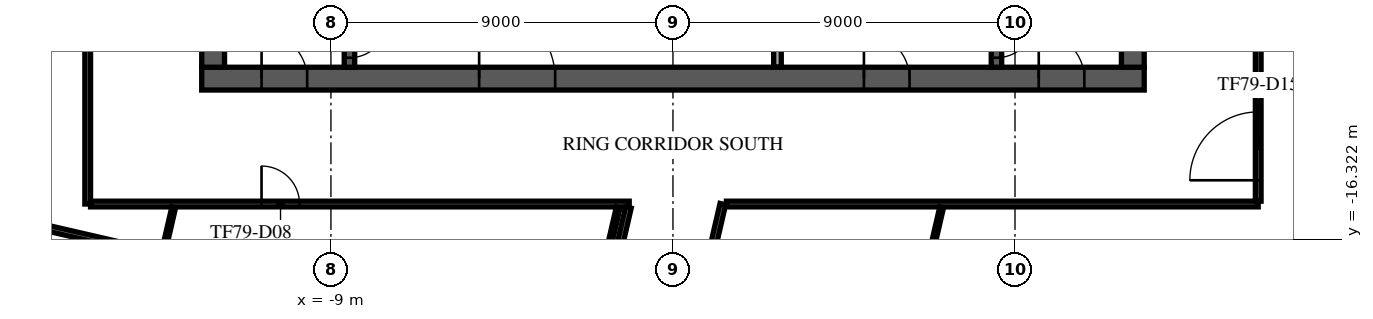
"""IFC4 building model, lengths in metres.
Left out: names, types, materials, properties, quantities, classifications, styles, units other than length and angle.
Written with IfcOpenShell. Run it as: python <this file> out.ifc"""

import sys

from ifc_helpers import new_model, si_unit, direction, frame, frame_2d, origin, place, context, subcontext, project, spatial, rectangle, extrude, element, fill, save


model = new_model("IFC4")
c1 = context("Model", 3, precision=1e-05, world=origin(), true_north=direction((0.0, 1.0)))
c2 = subcontext(c1, "Body", "Model", "MODEL_VIEW")
j1 = project(units=[si_unit("LENGTHUNIT", "METRE"), si_unit("PLANEANGLEUNIT", "RADIAN")], contexts=[c1])
p1 = place(None, origin())
s1 = spatial("IfcSite", under=j1, at=p1, CompositionType="ELEMENT")
p2 = place(p1, origin())
s2 = spatial("IfcBuilding", under=s1, at=p2, CompositionType="ELEMENT")
p3 = place(p2, frame((0.0, 0.0, 332.5)))
s3 = spatial("IfcBuildingStorey", under=s2, at=p3, CompositionType="ELEMENT", Elevation=332.5)
p4 = place(p3, frame((-12.4, -12.1, 0.0), z_axis=(0.0, 0.0, 1.0), x_axis=(1.0, 0.0, 0.0)))
e1 = element("IfcWall", 1, at=p4, inside=s3, PredefinedType="SHEAR", context=c2, shape_type="SweptSolid", body=[
    extrude(rectangle(XDim=24.8, YDim=0.6, at=frame_2d((12.4, 0.0))), origin(), (0.0, 0.0, 1.0), 3.65),
])
p5 = place(p4, frame((7.3, 0.0, 0.0)))
e2 = element("IfcOpeningElement", 2, at=p5, cuts=e1, PredefinedType="OPENING", context=c2, shape_type="SweptSolid", body=[
    extrude(rectangle(XDim=2.0, YDim=2.1, at=frame_2d((1.0, 1.05))), frame((0.0, 0.31, 0.0), z_axis=(0.0, -1.0, 0.0), x_axis=(1.0, 0.0, 0.0)), (0.0, 0.0, 1.0), 0.62),
])
p6 = place(p4, frame((17.425, 0.0, 0.0)))
e3 = element("IfcOpeningElement", 3, at=p6, cuts=e1, PredefinedType="OPENING", context=c2, shape_type="SweptSolid", body=[
    extrude(rectangle(XDim=1.2, YDim=2.1, at=frame_2d((0.6, 1.05))), frame((0.0, 0.31, 0.0), z_axis=(0.0, -1.0, 0.0), x_axis=(1.0, 0.0, 0.0)), (0.0, 0.0, 1.0), 0.62),
])
p7 = place(p4, frame((1.575, 0.0, 0.0)))
e4 = element("IfcOpeningElement", 4, at=p7, cuts=e1, PredefinedType="OPENING", context=c2, shape_type="SweptSolid", body=[
    extrude(rectangle(XDim=1.2, YDim=2.1, at=frame_2d((0.6, 1.05))), frame((0.0, 0.31, 0.0), z_axis=(0.0, -1.0, 0.0), x_axis=(1.0, 0.0, 0.0)), (0.0, 0.0, 1.0), 0.62),
])
p8 = place(p4, frame((22.025, 0.0, 0.0)))
e5 = element("IfcOpeningElement", 5, at=p8, cuts=e1, PredefinedType="OPENING", context=c2, shape_type="SweptSolid", body=[
    extrude(rectangle(XDim=1.2, YDim=2.1, at=frame_2d((0.6, 1.05))), frame((0.0, 0.31, 0.0), z_axis=(0.0, -1.0, 0.0), x_axis=(1.0, 0.0, 0.0)), (0.0, 0.0, 1.0), 0.62),
])
p9 = place(p3, frame((12.1, -11.8, 0.0), z_axis=(0.0, 0.0, 1.0), x_axis=(0.0, 1.0, 0.0)))
e6 = element("IfcWall", 6, at=p9, inside=s3, PredefinedType="SHEAR", context=c2, shape_type="SweptSolid", body=[
    extrude(rectangle(XDim=23.6, YDim=0.6, at=frame_2d((11.8, 0.0))), origin(), (0.0, 0.0, 1.0), 3.65),
])
p10 = place(p9, frame((10.6, 0.0, 0.0)))
e7 = element("IfcOpeningElement", 7, at=p10, cuts=e6, PredefinedType="OPENING", context=c2, shape_type="SweptSolid", body=[
    extrude(rectangle(XDim=2.4, YDim=2.4, at=frame_2d((1.2, 1.2))), frame((0.0, 0.31, 0.0), z_axis=(0.0, -1.0, 0.0), x_axis=(1.0, 0.0, 0.0)), (0.0, 0.0, 1.0), 0.62),
])
p11 = place(p3, frame((-12.1, -11.8, 0.0), z_axis=(0.0, 0.0, 1.0), x_axis=(0.0, 1.0, 0.0)))
e8 = element("IfcWall", 8, at=p11, inside=s3, PredefinedType="SHEAR", context=c2, shape_type="SweptSolid", body=[
    extrude(rectangle(XDim=23.6, YDim=0.6, at=frame_2d((11.8, 0.0))), origin(), (0.0, 0.0, 1.0), 3.65),
])
p12 = place(p11, frame((10.6, 0.0, 0.0)))
e9 = element("IfcOpeningElement", 9, at=p12, cuts=e8, PredefinedType="OPENING", context=c2, shape_type="SweptSolid", body=[
    extrude(rectangle(XDim=2.4, YDim=2.4, at=frame_2d((1.2, 1.2))), frame((0.0, 0.31, 0.0), z_axis=(0.0, -1.0, 0.0), x_axis=(1.0, 0.0, 0.0)), (0.0, 0.0, 1.0), 0.62),
])
p13 = place(p3, frame((-8.512, -4.55, 0.0), z_axis=(0.0, 0.0, 1.0), x_axis=(0.0, -1.0, 0.0)))
e10 = element("IfcWall", 10, at=p13, inside=s3, PredefinedType="SOLIDWALL", context=c2, shape_type="SweptSolid", body=[
    extrude(rectangle(XDim=7.25, YDim=0.275, at=frame_2d((3.625, 0.0))), origin(), (0.0, 0.0, 1.0), 3.65),
])
p14 = place(p13, frame((6.0, 0.0, 0.0)))
e11 = element("IfcOpeningElement", 11, at=p14, cuts=e10, PredefinedType="OPENING", context=c2, shape_type="SweptSolid", body=[
    extrude(rectangle(XDim=1.0, YDim=2.1, at=frame_2d((0.5, 1.05))), frame((0.0, 0.147, 0.0), z_axis=(0.0, -1.0, 0.0), x_axis=(1.0, 0.0, 0.0)), (0.0, 0.0, 1.0), 0.295),
])
p15 = place(p3, frame((8.512, -4.55, 0.0), z_axis=(0.0, 0.0, 1.0), x_axis=(0.0, -1.0, 0.0)))
e12 = element("IfcWall", 12, at=p15, inside=s3, PredefinedType="SOLIDWALL", context=c2, shape_type="SweptSolid", body=[
    extrude(rectangle(XDim=7.25, YDim=0.275, at=frame_2d((3.625, 0.0))), origin(), (0.0, 0.0, 1.0), 3.65),
])
p16 = place(p15, frame((6.0, 0.0, 0.0)))
e13 = element("IfcOpeningElement", 13, at=p16, cuts=e12, PredefinedType="OPENING", context=c2, shape_type="SweptSolid", body=[
    extrude(rectangle(XDim=1.0, YDim=2.1, at=frame_2d((0.5, 1.05))), frame((0.0, 0.147, 0.0), z_axis=(0.0, -1.0, 0.0), x_axis=(1.0, 0.0, 0.0)), (0.0, 0.0, 1.0), 0.295),
])
p17 = place(p3, frame((2.75, -11.795, 0.0), z_axis=(0.0, 0.0, 1.0), x_axis=(0.0, 1.0, 0.0)))
e14 = element("IfcWall", 14, at=p17, inside=s3, PredefinedType="PARTITIONING", context=c2, shape_type="SweptSolid", body=[
    extrude(rectangle(XDim=2.99, YDim=0.2, at=frame_2d((1.495, 0.0))), origin(), (0.0, 0.0, 1.0), 3.65),
])
p18 = place(p3, frame((-21.497, -14.872, 0.0), z_axis=(0.0, 0.0, 1.0), x_axis=(0.974371384758, -0.224945336838, 0.0)))
e15 = element("IfcWall", 15, at=p18, inside=s3, PredefinedType="PARTITIONING", context=c2, shape_type="SweptSolid", body=[
    extrude(rectangle(XDim=19.943, YDim=0.15, at=frame_2d((9.972, 0.0))), origin(), (0.0, 0.0, 1.0), 3.25),
])
p19 = place(p18, frame((3.8, 0.0, 0.0)))
e16 = element("IfcOpeningElement", 16, at=p19, cuts=e15, PredefinedType="OPENING", context=c2, shape_type="SweptSolid", body=[
    extrude(rectangle(XDim=1.0, YDim=2.1, at=frame_2d((0.5, 1.05))), frame((0.0, 0.085, 0.0), z_axis=(0.0, -1.0, 0.0), x_axis=(1.0, 0.0, 0.0)), (0.0, 0.0, 1.0), 0.17),
])
p20 = place(p3, frame((-15.4, -15.4, 0.0), z_axis=(0.0, 0.0, 1.0), x_axis=(0.0, 1.0, 0.0)))
e17 = element("IfcWall", 17, at=p20, inside=s3, PredefinedType="PARTITIONING", context=c2, shape_type="SweptSolid", body=[
    extrude(rectangle(XDim=30.8, YDim=0.15, at=frame_2d((15.4, 0.0))), origin(), (0.0, 0.0, 1.0), 3.25),
])
p21 = place(p20, frame((12.741, 0.0, 0.0)))
e18 = element("IfcOpeningElement", 18, at=p21, cuts=e17, PredefinedType="OPENING", context=c2, shape_type="SweptSolid", body=[
    extrude(rectangle(XDim=1.0, YDim=2.1, at=frame_2d((0.5, 1.05))), frame((0.0, 0.085, 0.0), z_axis=(0.0, -1.0, 0.0), x_axis=(1.0, 0.0, 0.0)), (0.0, 0.0, 1.0), 0.17),
])
p22 = place(p20, frame((6.05, 0.0, 0.0)))
e19 = element("IfcOpeningElement", 19, at=p22, cuts=e17, PredefinedType="OPENING", context=c2, shape_type="SweptSolid", body=[
    extrude(rectangle(XDim=1.8, YDim=2.1, at=frame_2d((0.9, 1.05))), frame((0.0, 0.085, 0.0), z_axis=(0.0, -1.0, 0.0), x_axis=(1.0, 0.0, 0.0)), (0.0, 0.0, 1.0), 0.17),
])
p23 = place(p20, frame((28.577, 0.0, 0.0)))
e20 = element("IfcOpeningElement", 20, at=p23, cuts=e17, PredefinedType="OPENING", context=c2, shape_type="SweptSolid", body=[
    extrude(rectangle(XDim=1.0, YDim=2.1, at=frame_2d((0.5, 1.05))), frame((0.0, 0.085, 0.0), z_axis=(0.0, -1.0, 0.0), x_axis=(1.0, 0.0, 0.0)), (0.0, 0.0, 1.0), 0.17),
])
p24 = place(p3, frame((-15.325, -15.4, 0.0), z_axis=(0.0, 0.0, 1.0), x_axis=(1.0, 0.0, 0.0)))
e21 = element("IfcWall", 21, at=p24, inside=s3, PredefinedType="PARTITIONING", context=c2, shape_type="SweptSolid", body=[
    extrude(rectangle(XDim=14.174, YDim=0.15, at=frame_2d((7.087, 0.0))), origin(), (0.0, 0.0, 1.0), 3.25),
])
p25 = place(p24, frame((4.499, 0.0, 0.0)))
e22 = element("IfcOpeningElement", 22, at=p25, cuts=e21, PredefinedType="OPENING", context=c2, shape_type="SweptSolid", body=[
    extrude(rectangle(XDim=1.0, YDim=2.1, at=frame_2d((0.5, 1.05))), frame((0.0, 0.085, 0.0), z_axis=(0.0, -1.0, 0.0), x_axis=(1.0, 0.0, 0.0)), (0.0, 0.0, 1.0), 0.17),
])
p26 = place(p3, frame((-2.048, -19.285, 0.0), z_axis=(0.0, 0.0, 1.0), x_axis=(0.225024396784, 0.974353129441, 0.0)))
e23 = element("IfcWall", 23, at=p26, inside=s3, PredefinedType="PARTITIONING", context=c2, shape_type="SweptSolid", body=[
    extrude(rectangle(XDim=3.893, YDim=0.15, at=frame_2d((1.946, 0.0))), origin(), (0.0, 0.0, 1.0), 3.25),
])
p27 = place(p3, frame((0.291, -19.825, 0.0), z_axis=(0.0, 0.0, 1.0), x_axis=(0.224824169945, 0.974399349655, 0.0)))
e24 = element("IfcWall", 24, at=p27, inside=s3, PredefinedType="PARTITIONING", context=c2, shape_type="SweptSolid", body=[
    extrude(rectangle(XDim=4.541, YDim=0.15, at=frame_2d((2.271, 0.0))), origin(), (0.0, 0.0, 1.0), 3.65),
])
p28 = place(p3, frame((1.406, -15.4, 0.0), z_axis=(0.0, 0.0, 1.0), x_axis=(1.0, 0.0, 0.0)))
e25 = element("IfcWall", 25, at=p28, inside=s3, PredefinedType="PARTITIONING", context=c2, shape_type="SweptSolid", body=[
    extrude(rectangle(XDim=13.994, YDim=0.15, at=frame_2d((6.997, 0.0))), origin(), (0.0, 0.0, 1.0), 3.25),
])
p29 = place(p3, frame((15.4, -15.325, 0.0), z_axis=(0.0, 0.0, 1.0), x_axis=(0.0, 1.0, 0.0)))
e26 = element("IfcWall", 26, at=p29, inside=s3, PredefinedType="PARTITIONING", context=c2, shape_type="SweptSolid", body=[
    extrude(rectangle(XDim=27.65, YDim=0.15, at=frame_2d((13.825, 0.0))), origin(), (0.0, 0.0, 1.0), 3.25),
])
p30 = place(p29, frame((0.55, 0.0, 0.0)))
e27 = element("IfcOpeningElement", 27, at=p30, cuts=e26, PredefinedType="OPENING", context=c2, shape_type="SweptSolid", body=[
    extrude(rectangle(XDim=1.8, YDim=2.1, at=frame_2d((0.9, 1.05))), frame((0.0, 0.085, 0.0), z_axis=(0.0, -1.0, 0.0), x_axis=(1.0, 0.0, 0.0)), (0.0, 0.0, 1.0), 0.17),
])
p31 = place(p29, frame((6.678, 0.0, 0.0)))
e28 = element("IfcOpeningElement", 28, at=p31, cuts=e26, PredefinedType="OPENING", context=c2, shape_type="SweptSolid", body=[
    extrude(rectangle(XDim=1.0, YDim=2.1, at=frame_2d((0.5, 1.05))), frame((0.0, 0.085, 0.0), z_axis=(0.0, -1.0, 0.0), x_axis=(1.0, 0.0, 0.0)), (0.0, 0.0, 1.0), 0.17),
])
p32 = place(p29, frame((23.322, 0.0, 0.0)))
e29 = element("IfcOpeningElement", 29, at=p32, cuts=e26, PredefinedType="OPENING", context=c2, shape_type="SweptSolid", body=[
    extrude(rectangle(XDim=1.8, YDim=2.1, at=frame_2d((0.9, 1.05))), frame((0.0, 0.085, 0.0), z_axis=(0.0, -1.0, 0.0), x_axis=(1.0, 0.0, 0.0)), (0.0, 0.0, 1.0), 0.17),
])
p33 = place(p3, frame((-13.408, -16.662, 0.0), z_axis=(0.0, 0.0, 1.0), x_axis=(0.22478562249, 0.974408242946, 0.0)))
e30 = element("IfcWall", 30, at=p33, inside=s3, PredefinedType="PARTITIONING", context=c2, shape_type="SweptSolid", body=[
    extrude(rectangle(XDim=1.207, YDim=0.1, at=frame_2d((0.603, 0.0))), origin(), (0.0, 0.0, 1.0), 3.25),
])
p34 = place(p3, frame((-2.303, -19.226, 0.0), z_axis=(0.0, 0.0, 1.0), x_axis=(0.224864152428, 0.974390123592, 0.0)))
e31 = element("IfcWall", 31, at=p34, inside=s3, PredefinedType="PARTITIONING", context=c2, shape_type="SweptSolid", body=[
    extrude(rectangle(XDim=3.838, YDim=0.1, at=frame_2d((1.919, 0.0))), origin(), (0.0, 0.0, 1.0), 3.25),
])
p35 = place(p3, frame((5.776, -21.091, 0.0), z_axis=(0.0, 0.0, 1.0), x_axis=(0.224989694642, 0.974361143162, 0.0)))
e32 = element("IfcWall", 32, at=p35, inside=s3, PredefinedType="PARTITIONING", context=c2, shape_type="SweptSolid", body=[
    extrude(rectangle(XDim=5.752, YDim=0.1, at=frame_2d((2.876, 0.0))), origin(), (0.0, 0.0, 1.0), 3.65),
])
p36 = place(p5, origin())
e33 = element("IfcDoor", 33, at=p36, inside=s3, OperationType="SINGLE_SWING_LEFT", PredefinedType="DOOR", context=c2, shape_type="SweptSolid", body=[
    extrude(rectangle(XDim=2.0, YDim=2.1, at=frame_2d((1.0, 1.05))), frame((0.0, 0.025, 0.0), z_axis=(0.0, -1.0, 0.0), x_axis=(1.0, 0.0, 0.0)), (0.0, 0.0, 1.0), 0.05),
])
fill(e2, e33)
p37 = place(p6, origin())
e34 = element("IfcDoor", 34, at=p37, inside=s3, OperationType="SINGLE_SWING_LEFT", PredefinedType="DOOR", context=c2, shape_type="SweptSolid", body=[
    extrude(rectangle(XDim=1.2, YDim=2.1, at=frame_2d((0.6, 1.05))), frame((0.0, 0.025, 0.0), z_axis=(0.0, -1.0, 0.0), x_axis=(1.0, 0.0, 0.0)), (0.0, 0.0, 1.0), 0.05),
])
fill(e3, e34)
p38 = place(p7, origin())
e35 = element("IfcDoor", 35, at=p38, inside=s3, OperationType="SINGLE_SWING_LEFT", PredefinedType="DOOR", context=c2, shape_type="SweptSolid", body=[
    extrude(rectangle(XDim=1.2, YDim=2.1, at=frame_2d((0.6, 1.05))), frame((0.0, 0.025, 0.0), z_axis=(0.0, -1.0, 0.0), x_axis=(1.0, 0.0, 0.0)), (0.0, 0.0, 1.0), 0.05),
])
fill(e4, e35)
p39 = place(p8, origin())
e36 = element("IfcDoor", 36, at=p39, inside=s3, OperationType="SINGLE_SWING_LEFT", PredefinedType="DOOR", context=c2, shape_type="SweptSolid", body=[
    extrude(rectangle(XDim=1.2, YDim=2.1, at=frame_2d((0.6, 1.05))), frame((0.0, 0.025, 0.0), z_axis=(0.0, -1.0, 0.0), x_axis=(1.0, 0.0, 0.0)), (0.0, 0.0, 1.0), 0.05),
])
fill(e5, e36)
p40 = place(p14, origin())
e37 = element("IfcDoor", 37, at=p40, inside=s3, OperationType="SINGLE_SWING_LEFT", PredefinedType="DOOR", context=c2, shape_type="SweptSolid", body=[
    extrude(rectangle(XDim=1.0, YDim=2.1, at=frame_2d((0.5, 1.05))), frame((0.0, 0.025, 0.0), z_axis=(0.0, -1.0, 0.0), x_axis=(1.0, 0.0, 0.0)), (0.0, 0.0, 1.0), 0.05),
])
fill(e11, e37)
p41 = place(p16, origin())
e38 = element("IfcDoor", 38, at=p41, inside=s3, OperationType="SINGLE_SWING_LEFT", PredefinedType="DOOR", context=c2, shape_type="SweptSolid", body=[
    extrude(rectangle(XDim=1.0, YDim=2.1, at=frame_2d((0.5, 1.05))), frame((0.0, 0.025, 0.0), z_axis=(0.0, -1.0, 0.0), x_axis=(1.0, 0.0, 0.0)), (0.0, 0.0, 1.0), 0.05),
])
fill(e13, e38)
p42 = place(p25, frame((1.0, 0.0, 0.0), z_axis=(0.0, 0.0, 1.0), x_axis=(-1.0, 0.0, 0.0)))
e39 = element("IfcDoor", 39, at=p42, inside=s3, OperationType="SINGLE_SWING_RIGHT", PredefinedType="DOOR", context=c2, shape_type="SweptSolid", body=[
    extrude(rectangle(XDim=1.0, YDim=2.1, at=frame_2d((0.5, 1.05))), frame((0.0, 0.025, 0.0), z_axis=(0.0, -1.0, 0.0), x_axis=(1.0, 0.0, 0.0)), (0.0, 0.0, 1.0), 0.05),
])
fill(e22, e39)
p43 = place(p30, frame((1.8, 0.0, 0.0), z_axis=(0.0, 0.0, 1.0), x_axis=(-1.0, 0.0, 0.0)))
e40 = element("IfcDoor", 40, at=p43, inside=s3, OperationType="DOUBLE_DOOR_SINGLE_SWING", PredefinedType="DOOR", context=c2, shape_type="SweptSolid", body=[
    extrude(rectangle(XDim=1.8, YDim=2.1, at=frame_2d((0.9, 1.05))), frame((0.0, 0.025, 0.0), z_axis=(0.0, -1.0, 0.0), x_axis=(1.0, 0.0, 0.0)), (0.0, 0.0, 1.0), 0.05),
])
fill(e27, e40)
save(model, sys.argv[1])
